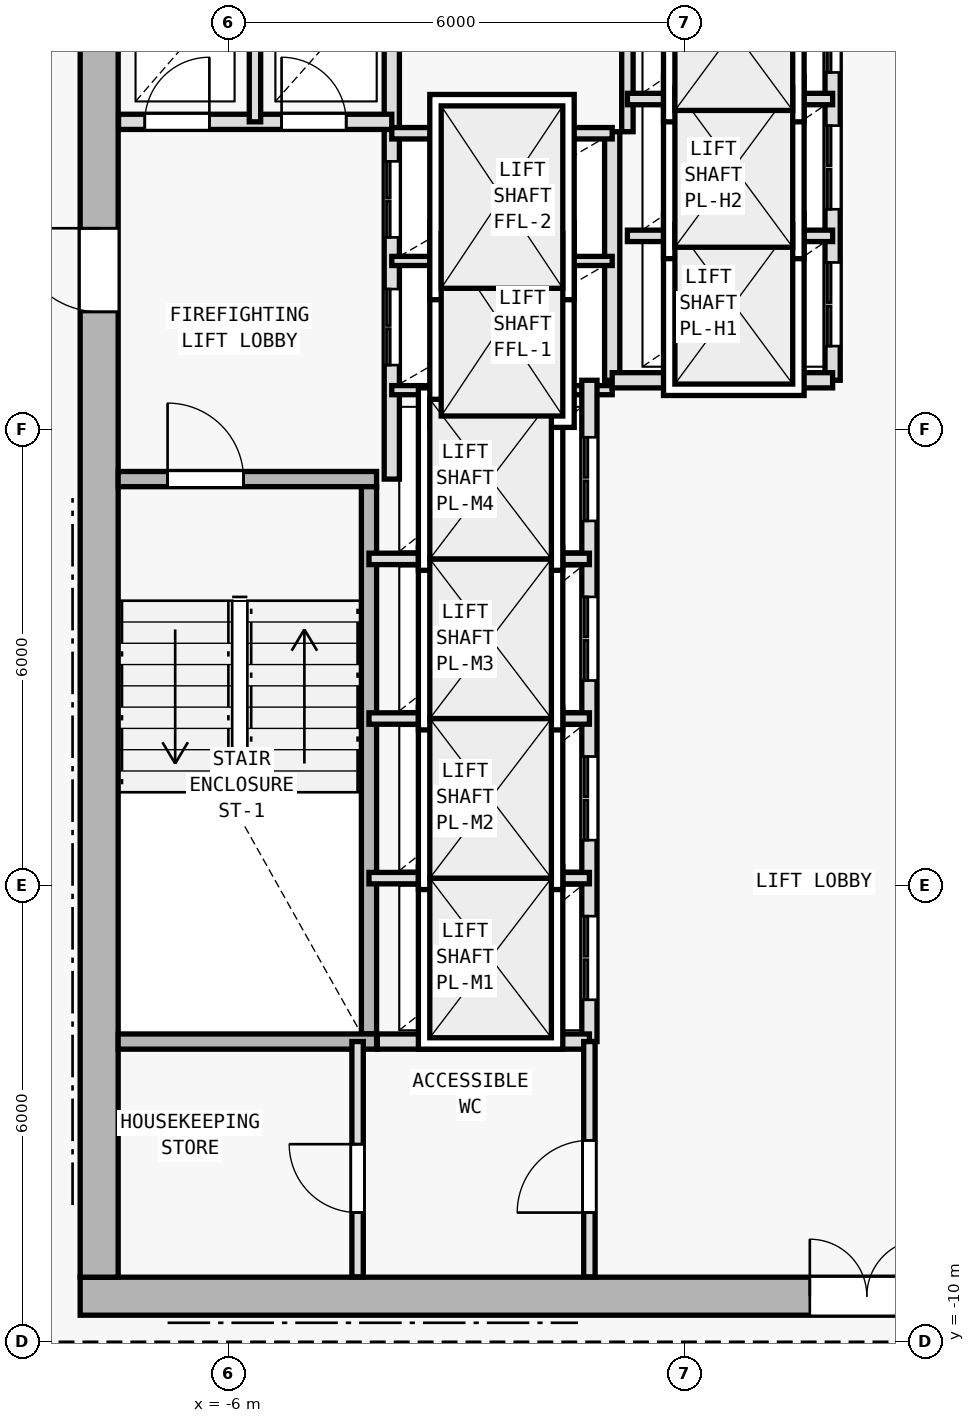
"""IFC4 building model, lengths in metres.
Left out: names, types, materials, properties, quantities, classifications, styles, units other than length and angle.
Written with IfcOpenShell. Run it as: python <this file> out.ifc"""

import sys

from ifc_helpers import new_model, si_unit, direction, frame, frame_2d, origin, origin_2d, place, context, subcontext, project, spatial, rectangle, i_section, extrude, element, fill, save


model = new_model("IFC4")
c1 = context("Model", 3, precision=1e-05, world=origin(), true_north=direction((0.0, 1.0)))
c2 = subcontext(c1, "Body", "Model", "MODEL_VIEW")
j1 = project(units=[si_unit("LENGTHUNIT", "METRE"), si_unit("PLANEANGLEUNIT", "RADIAN")], contexts=[c1])
p1 = place(None, origin())
s1 = spatial("IfcSite", under=j1, at=p1, CompositionType="ELEMENT")
p2 = place(p1, origin())
s2 = spatial("IfcBuilding", under=s1, at=p2, CompositionType="ELEMENT")
p3 = place(p2, frame((0.0, 0.0, 198.3)))
s3 = spatial("IfcBuildingStorey", under=s2, at=p3, CompositionType="ELEMENT", Elevation=198.3)
for number, where, z_axis, x_axis in (
    (1, (-7.7, -9.4, 0.0), (0.0, 0.0, 1.0), (1.0, 0.0, 0.0)),
    (2, (0.0, -9.4, 0.0), (0.0, 0.0, 1.0), (1.0, 0.0, 0.0)),
    (3, (-7.7, 2.0, 0.0), (0.0, 0.0, 1.0), (1.0, 0.0, 0.0)),
):
    element("IfcColumn", number, at=place(p3, frame(where, z_axis=z_axis, x_axis=x_axis)), inside=s3, PredefinedType="COLUMN", context=c2, shape_type="SweptSolid", body=[
        extrude(i_section(OverallWidth=0.398, OverallDepth=0.387, WebThickness=0.013, FlangeThickness=0.022, FilletRadius=0.015, at=origin_2d()), origin(), (0.0, 0.0, 1.0), 3.6),
    ])
p4 = place(p3, frame((-7.95, -9.4, 0.0), z_axis=(0.0, 0.0, 1.0), x_axis=(1.0, 0.0, 0.0)))
e4 = element("IfcWall", 4, at=p4, inside=s3, PredefinedType="SHEAR", context=c2, shape_type="SweptSolid", body=[
    extrude(rectangle(XDim=15.9, YDim=0.5, at=frame_2d((7.95, 0.0))), origin(), (0.0, 0.0, 1.0), 3.35),
])
p5 = place(p4, frame((9.6, 0.0, 0.0)))
e5 = element("IfcOpeningElement", 5, at=p5, cuts=e4, PredefinedType="OPENING", context=c2, shape_type="SweptSolid", body=[
    extrude(rectangle(XDim=1.5, YDim=2.2, at=frame_2d((0.75, 1.1))), frame((0.0, 0.26, 0.0), z_axis=(0.0, -1.0, 0.0), x_axis=(1.0, 0.0, 0.0)), (0.0, 0.0, 1.0), 0.52),
])
p6 = place(p3, frame((-7.7, -9.15, 0.0), z_axis=(0.0, 0.0, 1.0), x_axis=(0.0, 1.0, 0.0)))
e6 = element("IfcWall", 6, at=p6, inside=s3, PredefinedType="SHEAR", context=c2, shape_type="SweptSolid", body=[
    extrude(rectangle(XDim=19.1, YDim=0.5, at=frame_2d((9.55, 0.0))), origin(), (0.0, 0.0, 1.0), 3.35),
])
p7 = place(p6, frame((12.7, 0.0, 0.0)))
e7 = element("IfcOpeningElement", 7, at=p7, cuts=e6, PredefinedType="OPENING", context=c2, shape_type="SweptSolid", body=[
    extrude(rectangle(XDim=1.1, YDim=2.15, at=frame_2d((0.55, 1.075))), frame((0.0, 0.26, 0.0), z_axis=(0.0, -1.0, 0.0), x_axis=(1.0, 0.0, 0.0)), (0.0, 0.0, 1.0), 0.52),
])
p8 = place(p3, frame((-7.45, 1.35, 0.0), z_axis=(0.0, 0.0, 1.0), x_axis=(1.0, 0.0, 0.0)))
e8 = element("IfcWall", 8, at=p8, inside=s3, PredefinedType="SOLIDWALL", context=c2, shape_type="SweptSolid", body=[
    extrude(rectangle(XDim=3.4, YDim=0.2, at=frame_2d((1.7, 0.0))), origin(), (0.0, 0.0, 1.0), 3.35),
])
p9 = place(p8, frame((0.65, 0.0, 0.0)))
e9 = element("IfcOpeningElement", 9, at=p9, cuts=e8, PredefinedType="OPENING", context=c2, shape_type="SweptSolid", body=[
    extrude(rectangle(XDim=1.0, YDim=2.15, at=frame_2d((0.5, 1.075))), frame((0.0, 0.11, 0.0), z_axis=(0.0, -1.0, 0.0), x_axis=(1.0, 0.0, 0.0)), (0.0, 0.0, 1.0), 0.22),
])
p10 = place(p3, frame((-4.15, -5.95, 0.0), z_axis=(0.0, 0.0, 1.0), x_axis=(0.0, 1.0, 0.0)))
e10 = element("IfcWall", 10, at=p10, inside=s3, PredefinedType="SOLIDWALL", context=c2, shape_type="SweptSolid", body=[
    extrude(rectangle(XDim=7.2, YDim=0.2, at=frame_2d((3.6, 0.0))), origin(), (0.0, 0.0, 1.0), 3.35),
])
p11 = place(p3, frame((-3.85, 1.35, 0.0), z_axis=(0.0, 0.0, 1.0), x_axis=(0.0, 1.0, 0.0)))
e11 = element("IfcWall", 11, at=p11, inside=s3, PredefinedType="SOLIDWALL", context=c2, shape_type="SweptSolid", body=[
    extrude(rectangle(XDim=8.595, YDim=0.2, at=frame_2d((4.297, 0.0))), origin(), (0.0, 0.0, 1.0), 3.35),
])
p12 = place(p11, frame((1.5, 0.0, 0.0)))
e12 = element("IfcOpeningElement", 12, at=p12, cuts=e11, PredefinedType="OPENING", context=c2, shape_type="SweptSolid", body=[
    extrude(rectangle(XDim=1.0, YDim=2.15, at=frame_2d((0.5, 1.075))), frame((0.0, 0.11, 0.0), z_axis=(0.0, -1.0, 0.0), x_axis=(1.0, 0.0, 0.0)), (0.0, 0.0, 1.0), 0.22),
])
p13 = place(p11, frame((3.18, 0.0, 0.0)))
e13 = element("IfcOpeningElement", 13, at=p13, cuts=e11, PredefinedType="OPENING", context=c2, shape_type="SweptSolid", body=[
    extrude(rectangle(XDim=1.0, YDim=2.15, at=frame_2d((0.5, 1.075))), frame((0.0, 0.11, 0.0), z_axis=(0.0, -1.0, 0.0), x_axis=(1.0, 0.0, 0.0)), (0.0, 0.0, 1.0), 0.22),
])
p14 = place(p3, frame((-7.445, 6.05, 0.0), z_axis=(0.0, 0.0, 1.0), x_axis=(1.0, 0.0, 0.0)))
e14 = element("IfcWall", 14, at=p14, inside=s3, PredefinedType="SOLIDWALL", context=c2, shape_type="SweptSolid", body=[
    extrude(rectangle(XDim=3.595, YDim=0.2, at=frame_2d((1.797, 0.0))), origin(), (0.0, 0.0, 1.0), 3.35),
])
p15 = place(p14, frame((0.345, 0.0, 0.0)))
e15 = element("IfcOpeningElement", 15, at=p15, cuts=e14, PredefinedType="OPENING", context=c2, shape_type="SweptSolid", body=[
    extrude(rectangle(XDim=0.85, YDim=2.1, at=frame_2d((0.425, 1.05))), frame((0.0, 0.11, 0.0), z_axis=(0.0, -1.0, 0.0), x_axis=(1.0, 0.0, 0.0)), (0.0, 0.0, 1.0), 0.22),
])
p16 = place(p14, frame((2.145, 0.0, 0.0)))
e16 = element("IfcOpeningElement", 16, at=p16, cuts=e14, PredefinedType="OPENING", context=c2, shape_type="SweptSolid", body=[
    extrude(rectangle(XDim=0.85, YDim=2.1, at=frame_2d((0.425, 1.05))), frame((0.0, 0.11, 0.0), z_axis=(0.0, -1.0, 0.0), x_axis=(1.0, 0.0, 0.0)), (0.0, 0.0, 1.0), 0.22),
])
p17 = place(p3, frame((-5.65, 6.05, 0.0), z_axis=(0.0, 0.0, 1.0), x_axis=(0.0, 1.0, 0.0)))
e17 = element("IfcWall", 17, at=p17, inside=s3, PredefinedType="PARTITIONING", context=c2, shape_type="SweptSolid", body=[
    extrude(rectangle(XDim=2.05, YDim=0.15, at=frame_2d((1.025, 0.0))), origin(), (0.0, 0.0, 1.0), 3.35),
])
p18 = place(p3, frame((-0.95, 2.65, 0.0), z_axis=(0.0, 0.0, 1.0), x_axis=(0.0, 1.0, 0.0)))
e18 = element("IfcWall", 18, at=p18, inside=s3, PredefinedType="SOLIDWALL", context=c2, shape_type="SweptSolid", body=[
    extrude(rectangle(XDim=3.27, YDim=0.2, at=frame_2d((1.635, 0.0))), origin(), (0.0, 0.0, 1.0), 3.35),
])
for number, where, z_axis, x_axis in (
    (19, (-3.85, 2.52, 0.0), (0.0, 0.0, 1.0), (1.0, 0.0, 0.0)),
    (20, (-3.85, 4.22, 0.0), (0.0, 0.0, 1.0), (1.0, 0.0, 0.0)),
):
    element("IfcWall", number, at=place(p3, frame(where, z_axis=z_axis, x_axis=x_axis)), inside=s3, PredefinedType="PARTITIONING", context=c2, shape_type="SweptSolid", body=[
        extrude(rectangle(XDim=2.9, YDim=0.12, at=frame_2d((1.45, 0.0))), origin(), (0.0, 0.0, 1.0), 3.35),
    ])
p19 = place(p3, frame((-3.85, 5.9, 0.0), z_axis=(0.0, 0.0, 1.0), x_axis=(1.0, 0.0, 0.0)))
e21 = element("IfcWall", 21, at=p19, inside=s3, PredefinedType="PARTITIONING", context=c2, shape_type="SweptSolid", body=[
    extrude(rectangle(XDim=2.9, YDim=0.15, at=frame_2d((1.45, 0.0))), origin(), (0.0, 0.0, 1.0), 3.35),
])
p20 = place(p3, frame((-1.25, -6.05, 0.0), z_axis=(0.0, 0.0, 1.0), x_axis=(0.0, 1.0, 0.0)))
e22 = element("IfcWall", 22, at=p20, inside=s3, PredefinedType="SOLIDWALL", context=c2, shape_type="SweptSolid", body=[
    extrude(rectangle(XDim=8.7, YDim=0.2, at=frame_2d((4.35, 0.0))), origin(), (0.0, 0.0, 1.0), 3.35),
])
p21 = place(p20, frame((0.55, 0.0, 0.0)))
e23 = element("IfcOpeningElement", 23, at=p21, cuts=e22, PredefinedType="OPENING", context=c2, shape_type="SweptSolid", body=[
    extrude(rectangle(XDim=1.1, YDim=2.15, at=frame_2d((0.55, 1.075))), frame((0.0, 0.11, 0.0), z_axis=(0.0, -1.0, 0.0), x_axis=(1.0, 0.0, 0.0)), (0.0, 0.0, 1.0), 0.22),
])
p22 = place(p20, frame((2.65, 0.0, 0.0)))
e24 = element("IfcOpeningElement", 24, at=p22, cuts=e22, PredefinedType="OPENING", context=c2, shape_type="SweptSolid", body=[
    extrude(rectangle(XDim=1.1, YDim=2.15, at=frame_2d((0.55, 1.075))), frame((0.0, 0.11, 0.0), z_axis=(0.0, -1.0, 0.0), x_axis=(1.0, 0.0, 0.0)), (0.0, 0.0, 1.0), 0.22),
])
p23 = place(p20, frame((4.75, 0.0, 0.0)))
e25 = element("IfcOpeningElement", 25, at=p23, cuts=e22, PredefinedType="OPENING", context=c2, shape_type="SweptSolid", body=[
    extrude(rectangle(XDim=1.1, YDim=2.15, at=frame_2d((0.55, 1.075))), frame((0.0, 0.11, 0.0), z_axis=(0.0, -1.0, 0.0), x_axis=(1.0, 0.0, 0.0)), (0.0, 0.0, 1.0), 0.22),
])
p24 = place(p20, frame((6.85, 0.0, 0.0)))
e26 = element("IfcOpeningElement", 26, at=p24, cuts=e22, PredefinedType="OPENING", context=c2, shape_type="SweptSolid", body=[
    extrude(rectangle(XDim=1.1, YDim=2.15, at=frame_2d((0.55, 1.075))), frame((0.0, 0.11, 0.0), z_axis=(0.0, -1.0, 0.0), x_axis=(1.0, 0.0, 0.0)), (0.0, 0.0, 1.0), 0.22),
])
for number, where, z_axis, x_axis in (
    (27, (-4.15, -3.9, 0.0), (0.0, 0.0, 1.0), (1.0, 0.0, 0.0)),
    (28, (-4.15, -1.8, 0.0), (0.0, 0.0, 1.0), (1.0, 0.0, 0.0)),
    (29, (-4.15, 0.3, 0.0), (0.0, 0.0, 1.0), (1.0, 0.0, 0.0)),
):
    element("IfcWall", number, at=place(p3, frame(where, z_axis=z_axis, x_axis=x_axis)), inside=s3, PredefinedType="PARTITIONING", context=c2, shape_type="SweptSolid", body=[
        extrude(rectangle(XDim=2.9, YDim=0.15, at=frame_2d((1.45, 0.0))), origin(), (0.0, 0.0, 1.0), 3.35),
    ])
p25 = place(p3, frame((1.95, 2.65, 0.0), z_axis=(0.0, 0.0, 1.0), x_axis=(0.0, 1.0, 0.0)))
e30 = element("IfcWall", 30, at=p25, inside=s3, PredefinedType="SOLIDWALL", context=c2, shape_type="SweptSolid", body=[
    extrude(rectangle(XDim=7.295, YDim=0.2, at=frame_2d((3.647, 0.0))), origin(), (0.0, 0.0, 1.0), 3.35),
])
p26 = place(p25, frame((0.45, 0.0, 0.0)))
e31 = element("IfcOpeningElement", 31, at=p26, cuts=e30, PredefinedType="OPENING", context=c2, shape_type="SweptSolid", body=[
    extrude(rectangle(XDim=1.1, YDim=2.15, at=frame_2d((0.55, 1.075))), frame((0.0, 0.11, 0.0), z_axis=(0.0, -1.0, 0.0), x_axis=(1.0, 0.0, 0.0)), (0.0, 0.0, 1.0), 0.22),
])
p27 = place(p25, frame((2.25, 0.0, 0.0)))
e32 = element("IfcOpeningElement", 32, at=p27, cuts=e30, PredefinedType="OPENING", context=c2, shape_type="SweptSolid", body=[
    extrude(rectangle(XDim=1.1, YDim=2.15, at=frame_2d((0.55, 1.075))), frame((0.0, 0.11, 0.0), z_axis=(0.0, -1.0, 0.0), x_axis=(1.0, 0.0, 0.0)), (0.0, 0.0, 1.0), 0.22),
])
p28 = place(p25, frame((4.05, 0.0, 0.0)))
e33 = element("IfcOpeningElement", 33, at=p28, cuts=e30, PredefinedType="OPENING", context=c2, shape_type="SweptSolid", body=[
    extrude(rectangle(XDim=1.1, YDim=2.15, at=frame_2d((0.55, 1.075))), frame((0.0, 0.11, 0.0), z_axis=(0.0, -1.0, 0.0), x_axis=(1.0, 0.0, 0.0)), (0.0, 0.0, 1.0), 0.22),
])
p29 = place(p25, frame((5.85, 0.0, 0.0)))
e34 = element("IfcOpeningElement", 34, at=p29, cuts=e30, PredefinedType="OPENING", context=c2, shape_type="SweptSolid", body=[
    extrude(rectangle(XDim=1.1, YDim=2.15, at=frame_2d((0.55, 1.075))), frame((0.0, 0.11, 0.0), z_axis=(0.0, -1.0, 0.0), x_axis=(1.0, 0.0, 0.0)), (0.0, 0.0, 1.0), 0.22),
])
p30 = place(p3, frame((-0.95, 2.65, 0.0), z_axis=(0.0, 0.0, 1.0), x_axis=(1.0, 0.0, 0.0)))
e35 = element("IfcWall", 35, at=p30, inside=s3, PredefinedType="SOLIDWALL", context=c2, shape_type="SweptSolid", body=[
    extrude(rectangle(XDim=2.9, YDim=0.2, at=frame_2d((1.45, 0.0))), origin(), (0.0, 0.0, 1.0), 3.35),
])
p31 = place(p3, frame((-0.75, 5.92, 0.0), z_axis=(0.0, 0.0, 1.0), x_axis=(0.0, 1.0, 0.0)))
e36 = element("IfcWall", 36, at=p31, inside=s3, PredefinedType="PARTITIONING", context=c2, shape_type="SweptSolid", body=[
    extrude(rectangle(XDim=4.025, YDim=0.15, at=frame_2d((2.013, 0.0))), origin(), (0.0, 0.0, 1.0), 3.35),
])
for number, where, z_axis, x_axis in (
    (37, (-0.75, 4.55, 0.0), (0.0, 0.0, 1.0), (1.0, 0.0, 0.0)),
    (38, (-0.75, 6.35, 0.0), (0.0, 0.0, 1.0), (1.0, 0.0, 0.0)),
):
    element("IfcWall", number, at=place(p3, frame(where, z_axis=z_axis, x_axis=x_axis)), inside=s3, PredefinedType="PARTITIONING", context=c2, shape_type="SweptSolid", body=[
        extrude(rectangle(XDim=2.7, YDim=0.15, at=frame_2d((1.35, 0.0))), origin(), (0.0, 0.0, 1.0), 3.35),
    ])
p32 = place(p3, frame((-7.45, -6.05, 0.0), z_axis=(0.0, 0.0, 1.0), x_axis=(1.0, 0.0, 0.0)))
e39 = element("IfcWall", 39, at=p32, inside=s3, PredefinedType="SOLIDWALL", context=c2, shape_type="SweptSolid", body=[
    extrude(rectangle(XDim=3.4, YDim=0.2, at=frame_2d((1.7, 0.0))), origin(), (0.0, 0.0, 1.0), 3.35),
])
p33 = place(p3, frame((-4.04, -6.05, 0.0), z_axis=(0.0, 0.0, 1.0), x_axis=(1.0, 0.0, 0.0)))
e40 = element("IfcWall", 40, at=p33, inside=s3, PredefinedType="SOLIDWALL", context=c2, shape_type="SweptSolid", body=[
    extrude(rectangle(XDim=2.79, YDim=0.2, at=frame_2d((1.395, 0.0))), origin(), (0.0, 0.0, 1.0), 3.35),
])
p34 = place(p3, frame((-1.25, -9.145, 0.0), z_axis=(0.0, 0.0, 1.0), x_axis=(0.0, 1.0, 0.0)))
e41 = element("IfcWall", 41, at=p34, inside=s3, PredefinedType="PARTITIONING", context=c2, shape_type="SweptSolid", body=[
    extrude(rectangle(XDim=3.095, YDim=0.15, at=frame_2d((1.547, 0.0))), origin(), (0.0, 0.0, 1.0), 3.35),
])
p35 = place(p34, frame((0.845, 0.0, 0.0)))
e42 = element("IfcOpeningElement", 42, at=p35, cuts=e41, PredefinedType="OPENING", context=c2, shape_type="SweptSolid", body=[
    extrude(rectangle(XDim=0.95, YDim=2.1, at=frame_2d((0.475, 1.05))), frame((0.0, 0.085, 0.0), z_axis=(0.0, -1.0, 0.0), x_axis=(1.0, 0.0, 0.0)), (0.0, 0.0, 1.0), 0.17),
])
p36 = place(p3, frame((-4.3, -9.145, 0.0), z_axis=(0.0, 0.0, 1.0), x_axis=(0.0, 1.0, 0.0)))
e43 = element("IfcWall", 43, at=p36, inside=s3, PredefinedType="PARTITIONING", context=c2, shape_type="SweptSolid", body=[
    extrude(rectangle(XDim=3.095, YDim=0.15, at=frame_2d((1.547, 0.0))), origin(), (0.0, 0.0, 1.0), 3.35),
])
p37 = place(p36, frame((0.845, 0.0, 0.0)))
e44 = element("IfcOpeningElement", 44, at=p37, cuts=e43, PredefinedType="OPENING", context=c2, shape_type="SweptSolid", body=[
    extrude(rectangle(XDim=0.9, YDim=2.1, at=frame_2d((0.45, 1.05))), frame((0.0, 0.085, 0.0), z_axis=(0.0, -1.0, 0.0), x_axis=(1.0, 0.0, 0.0)), (0.0, 0.0, 1.0), 0.17),
])
p38 = place(p5, origin())
e45 = element("IfcDoor", 45, at=p38, inside=s3, OperationType="DOUBLE_DOOR_SINGLE_SWING", PredefinedType="DOOR", context=c2, shape_type="SweptSolid", body=[
    extrude(rectangle(XDim=1.5, YDim=2.2, at=frame_2d((0.75, 1.1))), frame((0.0, 0.025, 0.0), z_axis=(0.0, -1.0, 0.0), x_axis=(1.0, 0.0, 0.0)), (0.0, 0.0, 1.0), 0.05),
])
fill(e5, e45)
p39 = place(p7, origin())
e46 = element("IfcDoor", 46, at=p39, inside=s3, OperationType="SINGLE_SWING_RIGHT", PredefinedType="DOOR", context=c2, shape_type="SweptSolid", body=[
    extrude(rectangle(XDim=1.1, YDim=2.15, at=frame_2d((0.55, 1.075))), frame((0.0, 0.025, 0.0), z_axis=(0.0, -1.0, 0.0), x_axis=(1.0, 0.0, 0.0)), (0.0, 0.0, 1.0), 0.05),
])
fill(e7, e46)
p40 = place(p9, origin())
e47 = element("IfcDoor", 47, at=p40, inside=s3, OperationType="SINGLE_SWING_LEFT", PredefinedType="DOOR", context=c2, shape_type="SweptSolid", body=[
    extrude(rectangle(XDim=1.0, YDim=2.15, at=frame_2d((0.5, 1.075))), frame((0.0, 0.025, 0.0), z_axis=(0.0, -1.0, 0.0), x_axis=(1.0, 0.0, 0.0)), (0.0, 0.0, 1.0), 0.05),
])
fill(e9, e47)
p41 = place(p15, origin())
e48 = element("IfcDoor", 48, at=p41, inside=s3, OperationType="SINGLE_SWING_RIGHT", PredefinedType="DOOR", context=c2, shape_type="SweptSolid", body=[
    extrude(rectangle(XDim=0.85, YDim=2.1, at=frame_2d((0.425, 1.05))), frame((0.0, 0.025, 0.0), z_axis=(0.0, -1.0, 0.0), x_axis=(1.0, 0.0, 0.0)), (0.0, 0.0, 1.0), 0.05),
])
fill(e15, e48)
p42 = place(p16, origin())
e49 = element("IfcDoor", 49, at=p42, inside=s3, OperationType="SINGLE_SWING_LEFT", PredefinedType="DOOR", context=c2, shape_type="SweptSolid", body=[
    extrude(rectangle(XDim=0.85, YDim=2.1, at=frame_2d((0.425, 1.05))), frame((0.0, 0.025, 0.0), z_axis=(0.0, -1.0, 0.0), x_axis=(1.0, 0.0, 0.0)), (0.0, 0.0, 1.0), 0.05),
])
fill(e16, e49)
p43 = place(p21, origin())
e50 = element("IfcDoor", 50, at=p43, inside=s3, OperationType="DOUBLE_DOOR_SLIDING", PredefinedType="DOOR", context=c2, shape_type="SweptSolid", body=[
    extrude(rectangle(XDim=1.1, YDim=2.15, at=frame_2d((0.55, 1.075))), frame((0.0, 0.025, 0.0), z_axis=(0.0, -1.0, 0.0), x_axis=(1.0, 0.0, 0.0)), (0.0, 0.0, 1.0), 0.05),
])
fill(e23, e50)
p44 = place(p22, origin())
e51 = element("IfcDoor", 51, at=p44, inside=s3, OperationType="DOUBLE_DOOR_SLIDING", PredefinedType="DOOR", context=c2, shape_type="SweptSolid", body=[
    extrude(rectangle(XDim=1.1, YDim=2.15, at=frame_2d((0.55, 1.075))), frame((0.0, 0.025, 0.0), z_axis=(0.0, -1.0, 0.0), x_axis=(1.0, 0.0, 0.0)), (0.0, 0.0, 1.0), 0.05),
])
fill(e24, e51)
p45 = place(p23, origin())
e52 = element("IfcDoor", 52, at=p45, inside=s3, OperationType="DOUBLE_DOOR_SLIDING", PredefinedType="DOOR", context=c2, shape_type="SweptSolid", body=[
    extrude(rectangle(XDim=1.1, YDim=2.15, at=frame_2d((0.55, 1.075))), frame((0.0, 0.025, 0.0), z_axis=(0.0, -1.0, 0.0), x_axis=(1.0, 0.0, 0.0)), (0.0, 0.0, 1.0), 0.05),
])
fill(e25, e52)
p46 = place(p24, origin())
e53 = element("IfcDoor", 53, at=p46, inside=s3, OperationType="DOUBLE_DOOR_SLIDING", PredefinedType="DOOR", context=c2, shape_type="SweptSolid", body=[
    extrude(rectangle(XDim=1.1, YDim=2.15, at=frame_2d((0.55, 1.075))), frame((0.0, 0.025, 0.0), z_axis=(0.0, -1.0, 0.0), x_axis=(1.0, 0.0, 0.0)), (0.0, 0.0, 1.0), 0.05),
])
fill(e26, e53)
p47 = place(p26, origin())
e54 = element("IfcDoor", 54, at=p47, inside=s3, OperationType="DOUBLE_DOOR_SLIDING", PredefinedType="DOOR", context=c2, shape_type="SweptSolid", body=[
    extrude(rectangle(XDim=1.1, YDim=2.15, at=frame_2d((0.55, 1.075))), frame((0.0, 0.025, 0.0), z_axis=(0.0, -1.0, 0.0), x_axis=(1.0, 0.0, 0.0)), (0.0, 0.0, 1.0), 0.05),
])
fill(e31, e54)
p48 = place(p27, origin())
e55 = element("IfcDoor", 55, at=p48, inside=s3, OperationType="DOUBLE_DOOR_SLIDING", PredefinedType="DOOR", context=c2, shape_type="SweptSolid", body=[
    extrude(rectangle(XDim=1.1, YDim=2.15, at=frame_2d((0.55, 1.075))), frame((0.0, 0.025, 0.0), z_axis=(0.0, -1.0, 0.0), x_axis=(1.0, 0.0, 0.0)), (0.0, 0.0, 1.0), 0.05),
])
fill(e32, e55)
p49 = place(p28, origin())
e56 = element("IfcDoor", 56, at=p49, inside=s3, OperationType="DOUBLE_DOOR_SLIDING", PredefinedType="DOOR", context=c2, shape_type="SweptSolid", body=[
    extrude(rectangle(XDim=1.1, YDim=2.15, at=frame_2d((0.55, 1.075))), frame((0.0, 0.025, 0.0), z_axis=(0.0, -1.0, 0.0), x_axis=(1.0, 0.0, 0.0)), (0.0, 0.0, 1.0), 0.05),
])
fill(e33, e56)
p50 = place(p12, origin())
e57 = element("IfcDoor", 57, at=p50, inside=s3, OperationType="DOUBLE_DOOR_SLIDING", PredefinedType="DOOR", context=c2, shape_type="SweptSolid", body=[
    extrude(rectangle(XDim=1.0, YDim=2.15, at=frame_2d((0.5, 1.075))), frame((0.0, 0.025, 0.0), z_axis=(0.0, -1.0, 0.0), x_axis=(1.0, 0.0, 0.0)), (0.0, 0.0, 1.0), 0.05),
])
fill(e12, e57)
p51 = place(p13, origin())
e58 = element("IfcDoor", 58, at=p51, inside=s3, OperationType="DOUBLE_DOOR_SLIDING", PredefinedType="DOOR", context=c2, shape_type="SweptSolid", body=[
    extrude(rectangle(XDim=1.0, YDim=2.15, at=frame_2d((0.5, 1.075))), frame((0.0, 0.025, 0.0), z_axis=(0.0, -1.0, 0.0), x_axis=(1.0, 0.0, 0.0)), (0.0, 0.0, 1.0), 0.05),
])
fill(e13, e58)
p52 = place(p35, origin())
e59 = element("IfcDoor", 59, at=p52, inside=s3, OperationType="SINGLE_SWING_LEFT", PredefinedType="DOOR", context=c2, shape_type="SweptSolid", body=[
    extrude(rectangle(XDim=0.95, YDim=2.1, at=frame_2d((0.475, 1.05))), frame((0.0, 0.025, 0.0), z_axis=(0.0, -1.0, 0.0), x_axis=(1.0, 0.0, 0.0)), (0.0, 0.0, 1.0), 0.05),
])
fill(e42, e59)
p53 = place(p37, origin())
e60 = element("IfcDoor", 60, at=p53, inside=s3, OperationType="SINGLE_SWING_RIGHT", PredefinedType="DOOR", context=c2, shape_type="SweptSolid", body=[
    extrude(rectangle(XDim=0.9, YDim=2.1, at=frame_2d((0.45, 1.05))), frame((0.0, 0.025, 0.0), z_axis=(0.0, -1.0, 0.0), x_axis=(1.0, 0.0, 0.0)), (0.0, 0.0, 1.0), 0.05),
])
fill(e44, e60)
save(model, sys.argv[1])
